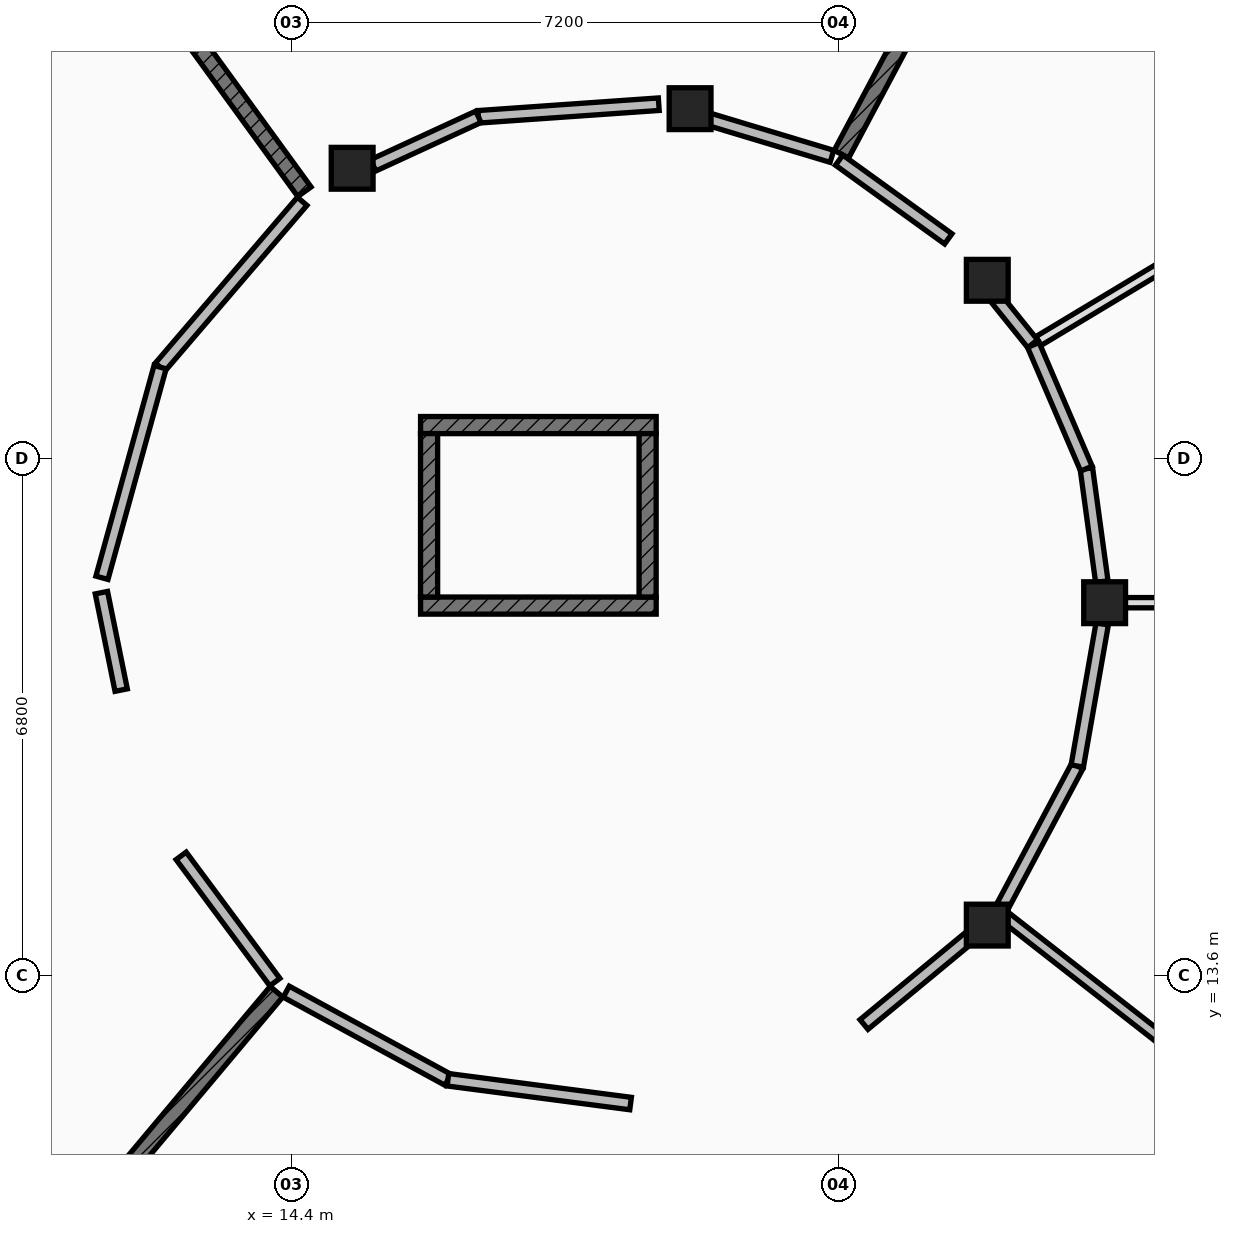
"""IFC4 building model, lengths in metres.
Left out: names, types, materials, properties, quantities, classifications, styles, units other than length and angle.
Written with IfcOpenShell. Run it as: python <this file> out.ifc"""

import sys

from ifc_helpers import new_model, si_unit, direction, frame, frame_2d, origin, origin_2d, place, context, subcontext, project, spatial, rectangle, extrude, element, fill, save


model = new_model("IFC4")
c1 = context("Model", 3, precision=1e-05, world=origin(), true_north=direction((0.0, 1.0)))
c2 = subcontext(c1, "Body", "Model", "MODEL_VIEW")
j1 = project(units=[si_unit("LENGTHUNIT", "METRE"), si_unit("PLANEANGLEUNIT", "RADIAN")], contexts=[c1])
p1 = place(None, origin())
s1 = spatial("IfcSite", under=j1, at=p1, CompositionType="ELEMENT")
p2 = place(p1, origin())
s2 = spatial("IfcBuilding", under=s1, at=p2, CompositionType="ELEMENT")
p3 = place(p2, origin())
s3 = spatial("IfcBuildingStorey", under=s2, at=p3, CompositionType="ELEMENT", Elevation=0.0)
for number, where, z_axis, x_axis in (
    (1, (25.1, 18.5, 0.0), (0.0, 0.0, 1.0), (1.0, 0.0, 0.0)),
    (2, (23.556, 22.742, 0.0), (0.0, 0.0, 1.0), (1.0, 0.0, 0.0)),
    (3, (19.646, 25.0, 0.0), (0.0, 0.0, 1.0), (1.0, 0.0, 0.0)),
    (4, (15.2, 24.216, 0.0), (0.0, 0.0, 1.0), (1.0, 0.0, 0.0)),
    (5, (23.556, 14.258, 0.0), (0.0, 0.0, 1.0), (1.0, 0.0, 0.0)),
):
    element("IfcColumn", number, at=place(p3, frame(where, z_axis=z_axis, x_axis=x_axis)), inside=s3, PredefinedType="COLUMN", context=c2, shape_type="SweptSolid", body=[
        extrude(rectangle(XDim=0.55, YDim=0.55, at=origin_2d()), origin(), (0.0, 0.0, 1.0), 4.55),
    ])
p4 = place(p3, frame((16.1, 18.462, 0.0), z_axis=(0.0, 0.0, 1.0), x_axis=(1.0, 0.0, 0.0)))
e6 = element("IfcWall", 6, at=p4, inside=s3, PredefinedType="SHEAR", context=c2, shape_type="SweptSolid", body=[
    extrude(rectangle(XDim=3.1, YDim=0.225, at=frame_2d((1.55, 0.0))), origin(), (0.0, 0.0, 1.0), 4.305),
])
p5 = place(p4, frame((0.9, 0.0, 0.0)))
e7 = element("IfcOpeningElement", 7, at=p5, cuts=e6, PredefinedType="OPENING", context=c2, shape_type="SweptSolid", body=[
    extrude(rectangle(XDim=1.3, YDim=2.2, at=frame_2d((0.65, 1.1))), frame((0.0, 0.123, 0.0), z_axis=(0.0, -1.0, 0.0), x_axis=(1.0, 0.0, 0.0)), (0.0, 0.0, 1.0), 0.245),
])
p6 = place(p3, frame((16.1, 20.837, 0.0), z_axis=(0.0, 0.0, 1.0), x_axis=(1.0, 0.0, 0.0)))
e8 = element("IfcWall", 8, at=p6, inside=s3, PredefinedType="SHEAR", context=c2, shape_type="SweptSolid", body=[
    extrude(rectangle(XDim=3.1, YDim=0.225, at=frame_2d((1.55, 0.0))), origin(), (0.0, 0.0, 1.0), 4.305),
])
for number, where, z_axis, x_axis in (
    (9, (16.212, 18.575, 0.0), (0.0, 0.0, 1.0), (0.0, 1.0, 0.0)),
    (10, (19.087, 18.575, 0.0), (0.0, 0.0, 1.0), (0.0, 1.0, 0.0)),
):
    element("IfcWall", number, at=place(p3, frame(where, z_axis=z_axis, x_axis=x_axis)), inside=s3, PredefinedType="SHEAR", context=c2, shape_type="SweptSolid", body=[
        extrude(rectangle(XDim=2.15, YDim=0.225, at=frame_2d((1.075, 0.0))), origin(), (0.0, 0.0, 1.0), 4.305),
    ])
p7 = place(p3, frame((21.637, 24.401, 0.0), z_axis=(0.0, 0.0, 1.0), x_axis=(0.469553538459, 0.882904000739, 0.0)))
e11 = element("IfcWall", 11, at=p7, inside=s3, PredefinedType="SOLIDWALL", context=c2, shape_type="SweptSolid", body=[
    extrude(rectangle(XDim=5.586, YDim=0.215, at=frame_2d((2.793, 0.0))), origin(), (0.0, 0.0, 1.0), 3.634),
])
p8 = place(p3, frame((14.572, 23.907, 0.0), z_axis=(0.0, 0.0, 1.0), x_axis=(-0.58782249157, 0.808989937146, 0.0)))
e12 = element("IfcWall", 12, at=p8, inside=s3, PredefinedType="SOLIDWALL", context=c2, shape_type="SweptSolid", body=[
    extrude(rectangle(XDim=5.571, YDim=0.215, at=frame_2d((2.786, 0.0))), origin(), (0.0, 0.0, 1.0), 3.634),
])
p9 = place(p3, frame((14.204, 13.381, 0.0), z_axis=(0.0, 0.0, 1.0), x_axis=(-0.642818869514, -0.766018211923, 0.0)))
e13 = element("IfcWall", 13, at=p9, inside=s3, PredefinedType="SOLIDWALL", context=c2, shape_type="SweptSolid", body=[
    extrude(rectangle(XDim=5.616, YDim=0.215, at=frame_2d((2.808, 0.0))), origin(), (0.0, 0.0, 1.0), 3.634),
])
p10 = place(p3, frame((23.766, 14.386, 0.0), z_axis=(0.0, 0.0, 1.0), x_axis=(0.787938235079, -0.615754283542, 0.0)))
e14 = element("IfcWall", 14, at=p10, inside=s3, PredefinedType="PARTITIONING", context=c2, shape_type="SweptSolid", body=[
    extrude(rectangle(XDim=5.587, YDim=0.145, at=frame_2d((2.793, 0.0))), origin(), (0.0, 0.0, 1.0), 3.634),
])
p11 = place(p3, frame((25.183, 18.5, 0.0), z_axis=(0.0, 0.0, 1.0), x_axis=(1.0, 0.0, 0.0)))
e15 = element("IfcWall", 15, at=p11, inside=s3, PredefinedType="PLUMBINGWALL", context=c2, shape_type="SweptSolid", body=[
    extrude(rectangle(XDim=5.616, YDim=0.135, at=frame_2d((2.808, 0.0))), origin(), (0.0, 0.0, 1.0), 3.634),
])
p12 = place(p3, frame((24.228, 21.942, 0.0), z_axis=(0.0, 0.0, 1.0), x_axis=(0.857177321279, 0.515021397501, 0.0)))
e16 = element("IfcWall", 16, at=p12, inside=s3, PredefinedType="PLUMBINGWALL", context=c2, shape_type="SweptSolid", body=[
    extrude(rectangle(XDim=5.6, YDim=0.135, at=frame_2d((2.8, 0.0))), origin(), (0.0, 0.0, 1.0), 3.634),
])
p13 = place(p3, frame((21.512, 24.373, 0.0), z_axis=(0.0, 0.0, 1.0), x_axis=(-0.957484705618, 0.288484035101, 0.0)))
e17 = element("IfcWall", 17, at=p13, inside=s3, PredefinedType="PARTITIONING", context=c2, shape_type="SweptSolid", body=[
    extrude(rectangle(XDim=1.695, YDim=0.165, at=frame_2d((0.848, 0.0))), origin(), (0.0, 0.0, 1.0), 3.634),
])
p14 = place(p13, frame((0.397, 0.0, 0.0)))
e18 = element("IfcOpeningElement", 18, at=p14, cuts=e17, PredefinedType="OPENING", context=c2, shape_type="SweptSolid", body=[
    extrude(rectangle(XDim=0.9, YDim=2.1, at=frame_2d((0.45, 1.05))), frame((0.0, 0.093, 0.0), z_axis=(0.0, -1.0, 0.0), x_axis=(1.0, 0.0, 0.0)), (0.0, 0.0, 1.0), 0.185),
])
p15 = place(p3, frame((19.234, 25.059, 0.0), z_axis=(0.0, 0.0, 1.0), x_axis=(-0.997561326003, -0.069795421513, 0.0)))
e19 = element("IfcWall", 19, at=p15, inside=s3, PredefinedType="PARTITIONING", context=c2, shape_type="SweptSolid", body=[
    extrude(rectangle(XDim=2.379, YDim=0.165, at=frame_2d((1.189, 0.0))), origin(), (0.0, 0.0, 1.0), 3.634),
])
p16 = place(p3, frame((16.861, 24.893, 0.0), z_axis=(0.0, 0.0, 1.0), x_axis=(-0.90810935664, -0.418733084893, 0.0)))
e20 = element("IfcWall", 20, at=p16, inside=s3, PredefinedType="PARTITIONING", context=c2, shape_type="SweptSolid", body=[
    extrude(rectangle(XDim=1.524, YDim=0.165, at=frame_2d((0.762, 0.0))), origin(), (0.0, 0.0, 1.0), 3.634),
])
p17 = place(p3, frame((14.542, 23.781, 0.0), z_axis=(0.0, 0.0, 1.0), x_axis=(-0.650532392373, -0.759478509554, 0.0)))
e21 = element("IfcWall", 21, at=p17, inside=s3, PredefinedType="PARTITIONING", context=c2, shape_type="SweptSolid", body=[
    extrude(rectangle(XDim=2.873, YDim=0.165, at=frame_2d((1.437, 0.0))), origin(), (0.0, 0.0, 1.0), 3.634),
])
p18 = place(p17, frame((0.762, 0.0, 0.0)))
e22 = element("IfcOpeningElement", 22, at=p18, cuts=e21, PredefinedType="OPENING", context=c2, shape_type="SweptSolid", body=[
    extrude(rectangle(XDim=1.35, YDim=2.22, at=frame_2d((0.675, 1.11))), frame((0.0, 0.093, 0.0), z_axis=(0.0, -1.0, 0.0), x_axis=(1.0, 0.0, 0.0)), (0.0, 0.0, 1.0), 0.185),
])
p19 = place(p3, frame((12.673, 21.599, 0.0), z_axis=(0.0, 0.0, 1.0), x_axis=(-0.266141246331, -0.963934041831, 0.0)))
e23 = element("IfcWall", 23, at=p19, inside=s3, PredefinedType="PARTITIONING", context=c2, shape_type="SweptSolid", body=[
    extrude(rectangle(XDim=2.875, YDim=0.165, at=frame_2d((1.438, 0.0))), origin(), (0.0, 0.0, 1.0), 3.634),
])
p20 = place(p3, frame((11.901, 18.632, 0.0), z_axis=(0.0, 0.0, 1.0), x_axis=(0.198771444408, -0.980045872849, 0.0)))
e24 = element("IfcWall", 24, at=p20, inside=s3, PredefinedType="PARTITIONING", context=c2, shape_type="SweptSolid", body=[
    extrude(rectangle(XDim=1.308, YDim=0.165, at=frame_2d((0.654, 0.0))), origin(), (0.0, 0.0, 1.0), 3.634),
])
p21 = place(p3, frame((12.95, 15.169, 0.0), z_axis=(0.0, 0.0, 1.0), x_axis=(0.596121900929, -0.802893940214, 0.0)))
e25 = element("IfcWall", 25, at=p21, inside=s3, PredefinedType="PARTITIONING", context=c2, shape_type="SweptSolid", body=[
    extrude(rectangle(XDim=2.069, YDim=0.165, at=frame_2d((1.034, 0.0))), origin(), (0.0, 0.0, 1.0), 3.634),
])
p22 = place(p21, frame((0.31, 0.0, 0.0)))
e26 = element("IfcOpeningElement", 26, at=p22, cuts=e25, PredefinedType="OPENING", context=c2, shape_type="SweptSolid", body=[
    extrude(rectangle(XDim=1.45, YDim=2.28, at=frame_2d((0.725, 1.14))), frame((0.0, 0.093, 0.0), z_axis=(0.0, -1.0, 0.0), x_axis=(1.0, 0.0, 0.0)), (0.0, 0.0, 1.0), 0.185),
])
p23 = place(p3, frame((14.333, 13.382, 0.0), z_axis=(0.0, 0.0, 1.0), x_axis=(0.87806499583, -0.478541391207, 0.0)))
e27 = element("IfcWall", 27, at=p23, inside=s3, PredefinedType="PARTITIONING", context=c2, shape_type="SweptSolid", body=[
    extrude(rectangle(XDim=2.422, YDim=0.165, at=frame_2d((1.211, 0.0))), origin(), (0.0, 0.0, 1.0), 3.634),
])
p24 = place(p23, frame((0.536, 0.0, 0.0)))
e28 = element("IfcOpeningElement", 28, at=p24, cuts=e27, PredefinedType="OPENING", context=c2, shape_type="SweptSolid", body=[
    extrude(rectangle(XDim=1.35, YDim=2.22, at=frame_2d((0.675, 1.11))), frame((0.0, 0.093, 0.0), z_axis=(0.0, -1.0, 0.0), x_axis=(1.0, 0.0, 0.0)), (0.0, 0.0, 1.0), 0.185),
])
p25 = place(p3, frame((16.46, 12.223, 0.0), z_axis=(0.0, 0.0, 1.0), x_axis=(0.991624550014, -0.129153984874, 0.0)))
e29 = element("IfcWall", 29, at=p25, inside=s3, PredefinedType="PARTITIONING", context=c2, shape_type="SweptSolid", body=[
    extrude(rectangle(XDim=2.423, YDim=0.165, at=frame_2d((1.212, 0.0))), origin(), (0.0, 0.0, 1.0), 3.634),
])
p26 = place(p3, frame((21.934, 12.95, 0.0), z_axis=(0.0, 0.0, 1.0), x_axis=(0.770643994758, 0.63726590474, 0.0)))
e30 = element("IfcWall", 30, at=p26, inside=s3, PredefinedType="PARTITIONING", context=c2, shape_type="SweptSolid", body=[
    extrude(rectangle(XDim=1.805, YDim=0.165, at=frame_2d((0.902, 0.0))), origin(), (0.0, 0.0, 1.0), 3.634),
])
p27 = place(p26, frame((0.332, 0.0, 0.0)))
e31 = element("IfcOpeningElement", 31, at=p27, cuts=e30, PredefinedType="OPENING", context=c2, shape_type="SweptSolid", body=[
    extrude(rectangle(XDim=1.14, YDim=2.28, at=frame_2d((0.57, 1.14))), frame((0.0, 0.093, 0.0), z_axis=(0.0, -1.0, 0.0), x_axis=(1.0, 0.0, 0.0)), (0.0, 0.0, 1.0), 0.185),
])
p28 = place(p3, frame((23.761, 14.514, 0.0), z_axis=(0.0, 0.0, 1.0), x_axis=(0.470283853227, 0.882515210857, 0.0)))
e32 = element("IfcWall", 32, at=p28, inside=s3, PredefinedType="PARTITIONING", context=c2, shape_type="SweptSolid", body=[
    extrude(rectangle(XDim=2.082, YDim=0.165, at=frame_2d((1.041, 0.0))), origin(), (0.0, 0.0, 1.0), 3.634),
])
p29 = place(p28, frame((0.411, 0.0, 0.0)))
e33 = element("IfcOpeningElement", 33, at=p29, cuts=e32, PredefinedType="OPENING", context=c2, shape_type="SweptSolid", body=[
    extrude(rectangle(XDim=1.26, YDim=2.28, at=frame_2d((0.63, 1.14))), frame((0.0, 0.093, 0.0), z_axis=(0.0, -1.0, 0.0), x_axis=(1.0, 0.0, 0.0)), (0.0, 0.0, 1.0), 0.185),
])
p30 = place(p3, frame((24.74, 16.351, 0.0), z_axis=(0.0, 0.0, 1.0), x_axis=(0.172751349053, 0.984965467111, 0.0)))
e34 = element("IfcWall", 34, at=p30, inside=s3, PredefinedType="PARTITIONING", context=c2, shape_type="SweptSolid", body=[
    extrude(rectangle(XDim=1.899, YDim=0.165, at=frame_2d((0.95, 0.0))), origin(), (0.0, 0.0, 1.0), 3.634),
])
p31 = place(p3, frame((25.063, 18.777, 0.0), z_axis=(0.0, 0.0, 1.0), x_axis=(-0.135200327393, 0.99081828378, 0.0)))
e35 = element("IfcWall", 35, at=p31, inside=s3, PredefinedType="PARTITIONING", context=c2, shape_type="SweptSolid", body=[
    extrude(rectangle(XDim=1.5, YDim=0.165, at=frame_2d((0.75, 0.0))), origin(), (0.0, 0.0, 1.0), 3.634),
])
p32 = place(p31, frame((0.3, 0.0, 0.0)))
e36 = element("IfcOpeningElement", 36, at=p32, cuts=e35, PredefinedType="OPENING", context=c2, shape_type="SweptSolid", body=[
    extrude(rectangle(XDim=0.9, YDim=2.1, at=frame_2d((0.45, 1.05))), frame((0.0, 0.093, 0.0), z_axis=(0.0, -1.0, 0.0), x_axis=(1.0, 0.0, 0.0)), (0.0, 0.0, 1.0), 0.185),
])
p33 = place(p3, frame((24.86, 20.264, 0.0), z_axis=(0.0, 0.0, 1.0), x_axis=(-0.394218825199, 0.91901660369, 0.0)))
e37 = element("IfcWall", 37, at=p33, inside=s3, PredefinedType="PARTITIONING", context=c2, shape_type="SweptSolid", body=[
    extrude(rectangle(XDim=1.771, YDim=0.165, at=frame_2d((0.885, 0.0))), origin(), (0.0, 0.0, 1.0), 3.634),
])
p34 = place(p3, frame((24.153, 21.907, 0.0), z_axis=(0.0, 0.0, 1.0), x_axis=(-0.627307635753, 0.77877155195, 0.0)))
e38 = element("IfcWall", 38, at=p34, inside=s3, PredefinedType="PARTITIONING", context=c2, shape_type="SweptSolid", body=[
    extrude(rectangle(XDim=0.751, YDim=0.165, at=frame_2d((0.375, 0.0))), origin(), (0.0, 0.0, 1.0), 3.634),
])
p35 = place(p3, frame((23.043, 23.287, 0.0), z_axis=(0.0, 0.0, 1.0), x_axis=(-0.811013589362, 0.585027313781, 0.0)))
e39 = element("IfcWall", 39, at=p35, inside=s3, PredefinedType="PARTITIONING", context=c2, shape_type="SweptSolid", body=[
    extrude(rectangle(XDim=1.771, YDim=0.165, at=frame_2d((0.885, 0.0))), origin(), (0.0, 0.0, 1.0), 3.634),
])
p36 = place(p35, frame((0.415, 0.0, 0.0)))
e40 = element("IfcOpeningElement", 40, at=p36, cuts=e39, PredefinedType="OPENING", context=c2, shape_type="SweptSolid", body=[
    extrude(rectangle(XDim=0.94, YDim=2.1, at=frame_2d((0.47, 1.05))), frame((0.0, 0.093, 0.0), z_axis=(0.0, -1.0, 0.0), x_axis=(1.0, 0.0, 0.0)), (0.0, 0.0, 1.0), 0.185),
])
p37 = place(p5, origin())
e41 = element("IfcDoor", 41, at=p37, inside=s3, OperationType="DOUBLE_DOOR_SLIDING", PredefinedType="DOOR", context=c2, shape_type="SweptSolid", body=[
    extrude(rectangle(XDim=1.3, YDim=2.2, at=frame_2d((0.65, 1.1))), frame((0.0, 0.025, 0.0), z_axis=(0.0, -1.0, 0.0), x_axis=(1.0, 0.0, 0.0)), (0.0, 0.0, 1.0), 0.05),
])
fill(e7, e41)
p38 = place(p14, origin())
e42 = element("IfcDoor", 42, at=p38, inside=s3, OperationType="SINGLE_SWING_LEFT", PredefinedType="DOOR", context=c2, shape_type="SweptSolid", body=[
    extrude(rectangle(XDim=0.9, YDim=2.1, at=frame_2d((0.45, 1.05))), frame((0.0, 0.025, 0.0), z_axis=(0.0, -1.0, 0.0), x_axis=(1.0, 0.0, 0.0)), (0.0, 0.0, 1.0), 0.05),
])
fill(e18, e42)
p39 = place(p18, origin())
e43 = element("IfcDoor", 43, at=p39, inside=s3, OperationType="SINGLE_SWING_RIGHT", PredefinedType="DOOR", context=c2, shape_type="SweptSolid", body=[
    extrude(rectangle(XDim=1.35, YDim=2.22, at=frame_2d((0.675, 1.11))), frame((0.0, 0.025, 0.0), z_axis=(0.0, -1.0, 0.0), x_axis=(1.0, 0.0, 0.0)), (0.0, 0.0, 1.0), 0.05),
])
fill(e22, e43)
p40 = place(p22, origin())
e44 = element("IfcDoor", 44, at=p40, inside=s3, OperationType="SINGLE_SWING_LEFT", PredefinedType="DOOR", context=c2, shape_type="SweptSolid", body=[
    extrude(rectangle(XDim=1.45, YDim=2.28, at=frame_2d((0.725, 1.14))), frame((0.0, 0.025, 0.0), z_axis=(0.0, -1.0, 0.0), x_axis=(1.0, 0.0, 0.0)), (0.0, 0.0, 1.0), 0.05),
])
fill(e26, e44)
p41 = place(p24, origin())
e45 = element("IfcDoor", 45, at=p41, inside=s3, OperationType="SINGLE_SWING_RIGHT", PredefinedType="DOOR", context=c2, shape_type="SweptSolid", body=[
    extrude(rectangle(XDim=1.35, YDim=2.22, at=frame_2d((0.675, 1.11))), frame((0.0, 0.025, 0.0), z_axis=(0.0, -1.0, 0.0), x_axis=(1.0, 0.0, 0.0)), (0.0, 0.0, 1.0), 0.05),
])
fill(e28, e45)
p42 = place(p27, origin())
e46 = element("IfcDoor", 46, at=p42, inside=s3, OperationType="SINGLE_SWING_LEFT", PredefinedType="DOOR", context=c2, shape_type="SweptSolid", body=[
    extrude(rectangle(XDim=1.14, YDim=2.28, at=frame_2d((0.57, 1.14))), frame((0.0, 0.025, 0.0), z_axis=(0.0, -1.0, 0.0), x_axis=(1.0, 0.0, 0.0)), (0.0, 0.0, 1.0), 0.05),
])
fill(e31, e46)
p43 = place(p29, origin())
e47 = element("IfcDoor", 47, at=p43, inside=s3, OperationType="SINGLE_SWING_RIGHT", PredefinedType="DOOR", context=c2, shape_type="SweptSolid", body=[
    extrude(rectangle(XDim=1.26, YDim=2.28, at=frame_2d((0.63, 1.14))), frame((0.0, 0.025, 0.0), z_axis=(0.0, -1.0, 0.0), x_axis=(1.0, 0.0, 0.0)), (0.0, 0.0, 1.0), 0.05),
])
fill(e33, e47)
p44 = place(p32, origin())
e48 = element("IfcDoor", 48, at=p44, inside=s3, OperationType="SINGLE_SWING_LEFT", PredefinedType="DOOR", context=c2, shape_type="SweptSolid", body=[
    extrude(rectangle(XDim=0.9, YDim=2.1, at=frame_2d((0.45, 1.05))), frame((0.0, 0.025, 0.0), z_axis=(0.0, -1.0, 0.0), x_axis=(1.0, 0.0, 0.0)), (0.0, 0.0, 1.0), 0.05),
])
fill(e36, e48)
p45 = place(p36, origin())
e49 = element("IfcDoor", 49, at=p45, inside=s3, OperationType="SINGLE_SWING_RIGHT", PredefinedType="DOOR", context=c2, shape_type="SweptSolid", body=[
    extrude(rectangle(XDim=0.94, YDim=2.1, at=frame_2d((0.47, 1.05))), frame((0.0, 0.025, 0.0), z_axis=(0.0, -1.0, 0.0), x_axis=(1.0, 0.0, 0.0)), (0.0, 0.0, 1.0), 0.05),
])
fill(e40, e49)
save(model, sys.argv[1])
